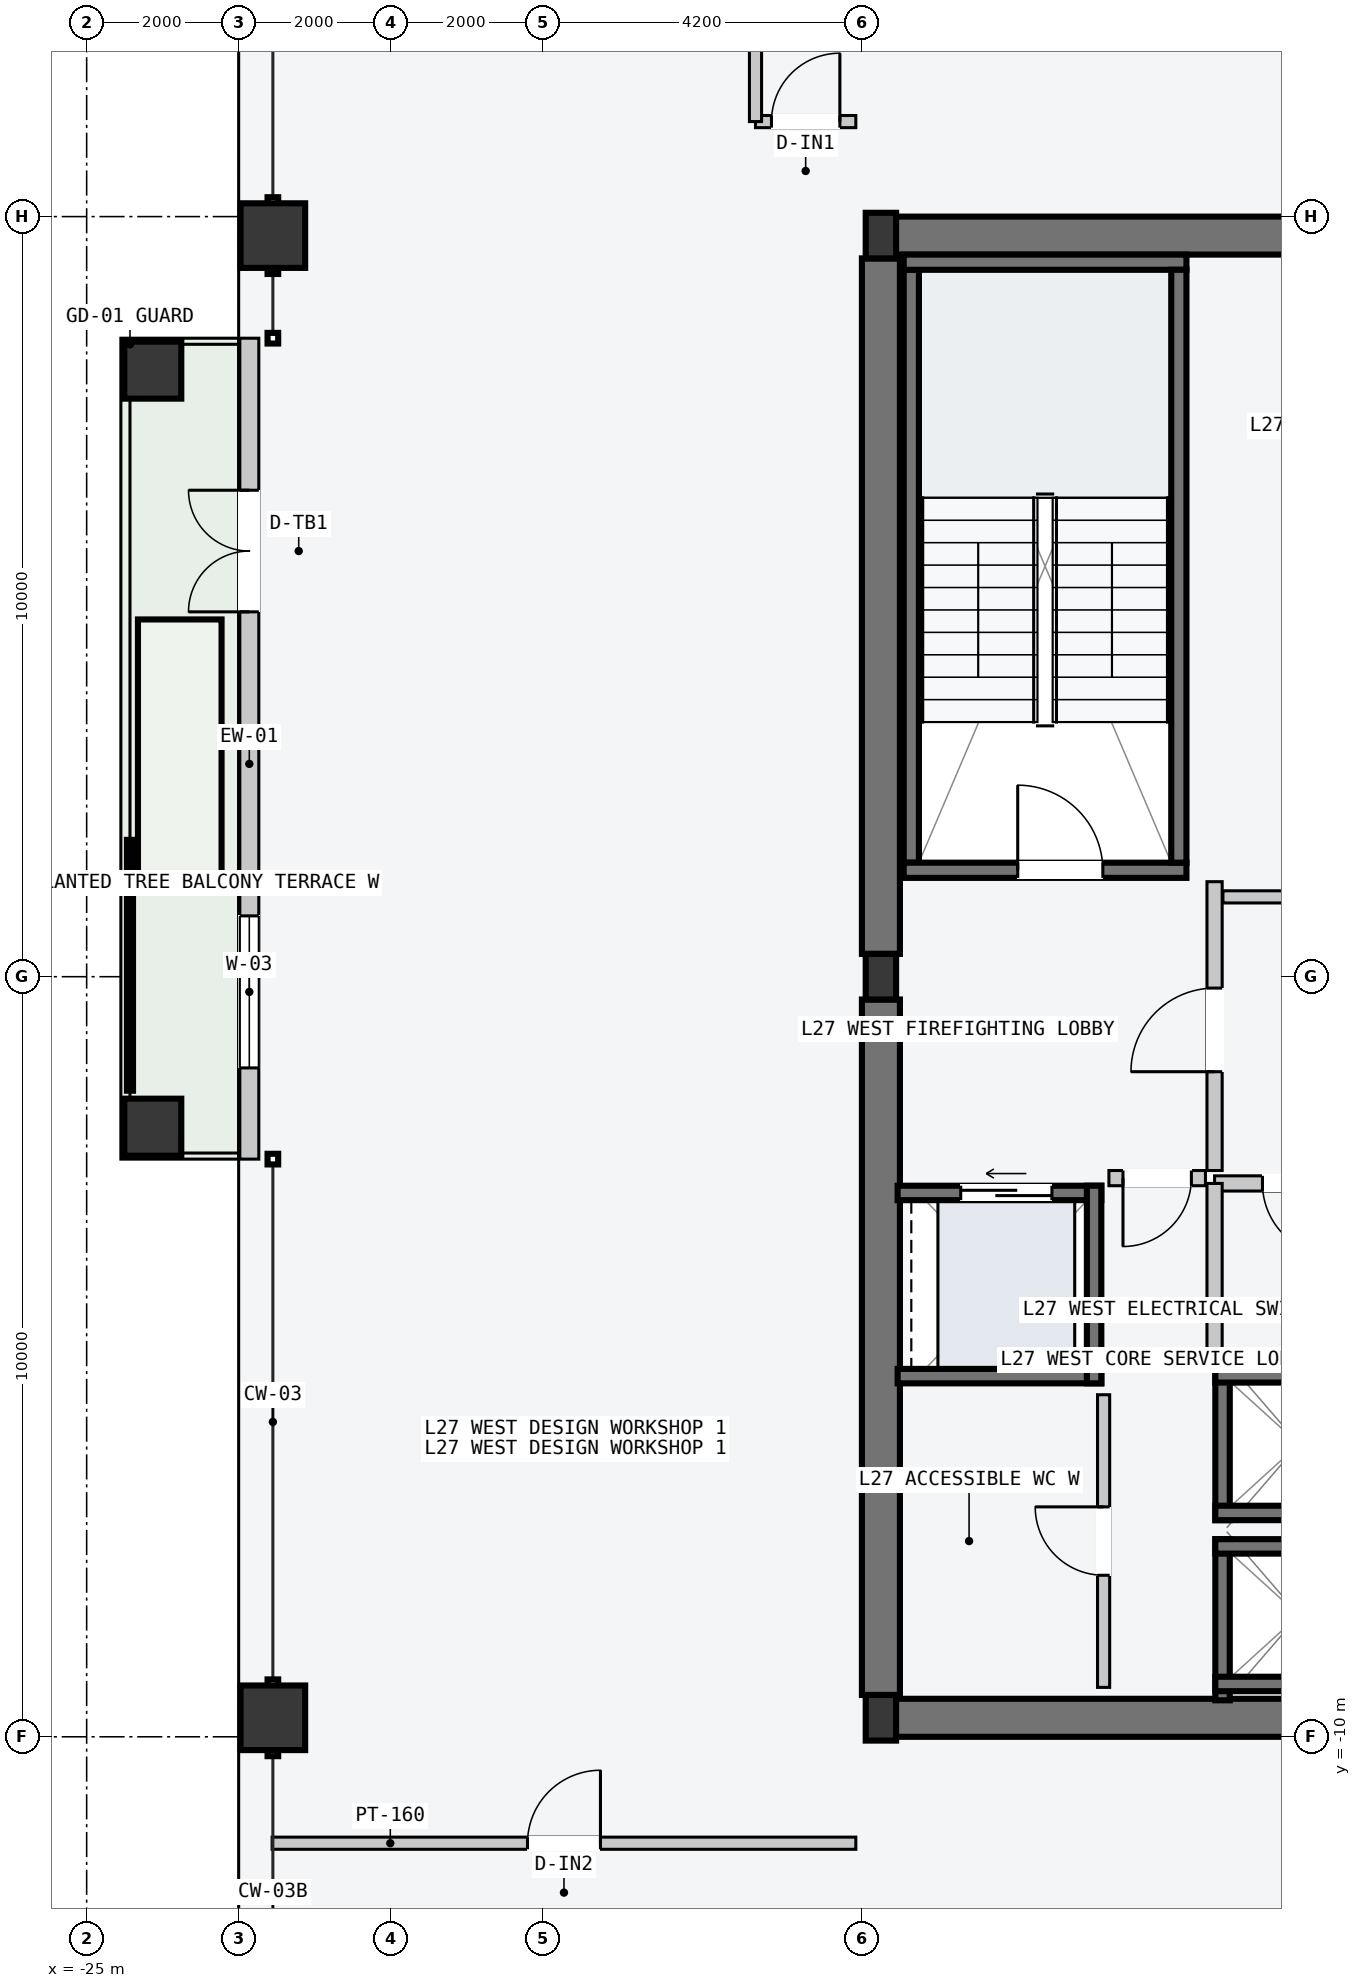
"""IFC4 building model, lengths in metres.
Left out: names, types, materials, properties, quantities, classifications, styles, units other than length and angle.
Written with IfcOpenShell. Run it as: python <this file> out.ifc"""

import sys

from ifc_helpers import new_model, si_unit, direction, frame, frame_2d, origin, origin_2d, place, context, subcontext, project, spatial, rectangle, hollow_rectangle, i_section, extrude, element, fill, save


model = new_model("IFC4")
c1 = context("Model", 3, precision=1e-05, world=origin(), true_north=direction((0.0, 1.0)))
c2 = subcontext(c1, "Body", "Model", "MODEL_VIEW")
j1 = project(units=[si_unit("LENGTHUNIT", "METRE"), si_unit("PLANEANGLEUNIT", "RADIAN")], contexts=[c1])
p1 = place(None, origin())
s1 = spatial("IfcSite", under=j1, at=p1, CompositionType="ELEMENT")
p2 = place(p1, origin())
s2 = spatial("IfcBuilding", under=s1, at=p2, CompositionType="ELEMENT")
p3 = place(p2, frame((0.0, 0.0, 106.2)))
s3 = spatial("IfcBuildingStorey", under=s2, at=p3, CompositionType="ELEMENT", Elevation=106.2)
for number, where, z_axis, x_axis in (
    (1, (-14.53, -9.75, -0.2), (0.0, 0.0, 1.0), (1.0, 0.0, 0.0)),
    (2, (-14.53, 9.75, -0.2), (0.0, 0.0, 1.0), (1.0, 0.0, 0.0)),
):
    element("IfcWall", number, at=place(p3, frame(where, z_axis=z_axis, x_axis=x_axis)), inside=s3, PredefinedType="SHEAR", context=c2, shape_type="SweptSolid", body=[
        extrude(rectangle(XDim=6.46, YDim=0.5, at=frame_2d((3.23, 0.0))), origin(), (0.0, 0.0, 1.0), 3.6),
    ])
for number, where, z_axis, x_axis in (
    (3, (-14.55, -9.45, -0.2), (0.0, 0.0, 1.0), (0.0, 1.0, 0.0)),
    (4, (-14.55, 0.3, -0.2), (0.0, 0.0, 1.0), (0.0, 1.0, 0.0)),
):
    element("IfcWall", number, at=place(p3, frame(where, z_axis=z_axis, x_axis=x_axis)), inside=s3, PredefinedType="SHEAR", context=c2, shape_type="SweptSolid", body=[
        extrude(rectangle(XDim=9.15, YDim=0.5, at=frame_2d((4.575, 0.0))), origin(), (0.0, 0.0, 1.0), 3.6),
    ])
p4 = place(p3, frame((-14.15, 1.5, -0.2), z_axis=(0.0, 0.0, 1.0), x_axis=(0.0, 1.0, 0.0)))
e5 = element("IfcWall", 5, at=p4, inside=s3, PredefinedType="SOLIDWALL", context=c2, shape_type="SweptSolid", body=[
    extrude(rectangle(XDim=7.8, YDim=0.2, at=frame_2d((3.9, 0.0))), origin(), (0.0, 0.0, 1.0), 3.6),
])
p5 = place(p3, frame((-14.25, 1.4, -0.2), z_axis=(0.0, 0.0, 1.0), x_axis=(1.0, 0.0, 0.0)))
e6 = element("IfcWall", 6, at=p5, inside=s3, PredefinedType="SOLIDWALL", context=c2, shape_type="SweptSolid", body=[
    extrude(rectangle(XDim=3.72, YDim=0.2, at=frame_2d((1.86, 0.0))), origin(), (0.0, 0.0, 1.0), 3.6),
])
p6 = place(p5, frame((1.5, 0.0, 0.2)))
e7 = element("IfcOpeningElement", 7, at=p6, cuts=e6, PredefinedType="OPENING", context=c2, shape_type="SweptSolid", body=[
    extrude(rectangle(XDim=1.12, YDim=2.18, at=frame_2d((0.56, 1.09))), frame((0.0, 0.11, 0.0), z_axis=(0.0, -1.0, 0.0), x_axis=(1.0, 0.0, 0.0)), (0.0, 0.0, 1.0), 0.22),
])
p7 = place(p3, frame((-14.25, 9.4, -0.2), z_axis=(0.0, 0.0, 1.0), x_axis=(1.0, 0.0, 0.0)))
e8 = element("IfcWall", 8, at=p7, inside=s3, PredefinedType="SOLIDWALL", context=c2, shape_type="SweptSolid", body=[
    extrude(rectangle(XDim=3.72, YDim=0.2, at=frame_2d((1.86, 0.0))), origin(), (0.0, 0.0, 1.0), 3.6),
])
p8 = place(p3, frame((-10.63, 1.5, -0.2), z_axis=(0.0, 0.0, 1.0), x_axis=(0.0, 1.0, 0.0)))
e9 = element("IfcWall", 9, at=p8, inside=s3, PredefinedType="SOLIDWALL", context=c2, shape_type="SweptSolid", body=[
    extrude(rectangle(XDim=7.8, YDim=0.2, at=frame_2d((3.9, 0.0))), origin(), (0.0, 0.0, 1.0), 3.6),
])
for number, where, z_axis, x_axis in (
    (10, (-14.55, -9.75, 0.0), (0.0, 0.0, 1.0), (1.0, 0.0, 0.0)),
    (11, (-14.55, 0.0, 0.0), (0.0, 0.0, 1.0), (1.0, 0.0, 0.0)),
    (12, (-14.55, 9.75, 0.0), (0.0, 0.0, 1.0), (1.0, 0.0, 0.0)),
):
    element("IfcColumn", number, at=place(p3, frame(where, z_axis=z_axis, x_axis=x_axis)), inside=s3, PredefinedType="COLUMN", context=c2, shape_type="SweptSolid", body=[
        extrude(i_section(OverallWidth=0.4, OverallDepth=0.6, WebThickness=0.022, FlangeThickness=0.036, at=origin_2d()), origin(), (0.0, 0.0, 1.0), 3.6),
    ])
for number, where, z_axis, x_axis in (
    (13, (-22.55, -9.75, 0.0), (0.0, 0.0, 1.0), (0.0, 1.0, 0.0)),
    (14, (-22.55, 9.75, 0.0), (0.0, 0.0, 1.0), (0.0, 1.0, 0.0)),
):
    element("IfcColumn", number, at=place(p3, frame(where, z_axis=z_axis, x_axis=x_axis)), inside=s3, PredefinedType="COLUMN", context=c2, shape_type="SweptSolid", body=[
        extrude(hollow_rectangle(XDim=0.85, YDim=0.85, WallThickness=0.04, at=origin_2d()), origin(), (0.0, 0.0, 1.0), 3.6),
    ])
for number, where, z_axis, x_axis in (
    (15, (-24.13, -1.98, 0.0), (0.0, 0.0, 1.0), (0.0, 1.0, 0.0)),
    (16, (-24.13, 7.98, 0.0), (0.0, 0.0, 1.0), (0.0, 1.0, 0.0)),
):
    element("IfcColumn", number, at=place(p3, frame(where, z_axis=z_axis, x_axis=x_axis)), inside=s3, PredefinedType="COLUMN", context=c2, shape_type="SweptSolid", body=[
        extrude(hollow_rectangle(XDim=0.75, YDim=0.75, WallThickness=0.032, at=origin_2d()), origin(), (0.0, 0.0, 1.0), 3.6),
    ])
p9 = place(p3, frame((-22.86, -2.4, 0.0), z_axis=(0.0, 0.0, 1.0), x_axis=(0.0, 1.0, 0.0)))
e17 = element("IfcWall", 17, at=p9, inside=s3, PredefinedType="STANDARD", context=c2, shape_type="SweptSolid", body=[
    extrude(rectangle(XDim=10.8, YDim=0.25, at=frame_2d((5.4, 0.0))), origin(), (0.0, 0.0, 1.0), 3.4),
])
p10 = place(p9, frame((7.2, 0.0, 0.0)))
e18 = element("IfcOpeningElement", 18, at=p10, cuts=e17, PredefinedType="OPENING", context=c2, shape_type="SweptSolid", body=[
    extrude(rectangle(XDim=1.6, YDim=2.2, at=frame_2d((0.8, 1.1))), frame((0.0, 0.135, 0.0), z_axis=(0.0, -1.0, 0.0), x_axis=(1.0, 0.0, 0.0)), (0.0, 0.0, 1.0), 0.27),
])
p11 = place(p9, frame((1.2, 0.0, 0.85)))
e19 = element("IfcOpeningElement", 19, at=p11, cuts=e17, PredefinedType="OPENING", context=c2, shape_type="SweptSolid", body=[
    extrude(rectangle(XDim=2.0, YDim=2.1, at=frame_2d((1.0, 1.05))), frame((0.0, 0.135, 0.0), z_axis=(0.0, -1.0, 0.0), x_axis=(1.0, 0.0, 0.0)), (0.0, 0.0, 1.0), 0.27),
])
p12 = place(p3, frame((-10.055, -9.52, -0.2), z_axis=(0.0, 0.0, 1.0), x_axis=(0.0, 1.0, 0.0)))
e20 = element("IfcWall", 20, at=p12, inside=s3, PredefinedType="SOLIDWALL", context=c2, shape_type="SweptSolid", body=[
    extrude(rectangle(XDim=2.12, YDim=0.19, at=frame_2d((1.06, 0.0))), origin(), (0.0, 0.0, 1.0), 3.6),
])
for number, where, z_axis, x_axis in (
    (21, (-10.15, -7.495, -0.2), (0.0, 0.0, 1.0), (1.0, 0.0, 0.0)),
    (22, (-10.15, -9.305, -0.2), (0.0, 0.0, 1.0), (1.0, 0.0, 0.0)),
):
    element("IfcWall", number, at=place(p3, frame(where, z_axis=z_axis, x_axis=x_axis)), inside=s3, PredefinedType="SOLIDWALL", context=c2, shape_type="SweptSolid", body=[
        extrude(rectangle(XDim=2.2, YDim=0.19, at=frame_2d((1.1, 0.0))), origin(), (0.0, 0.0, 1.0), 3.6),
    ])
p13 = place(p3, frame((-10.055, -7.15, -0.2), z_axis=(0.0, 0.0, 1.0), x_axis=(0.0, 1.0, 0.0)))
e23 = element("IfcWall", 23, at=p13, inside=s3, PredefinedType="SOLIDWALL", context=c2, shape_type="SweptSolid", body=[
    extrude(rectangle(XDim=2.0, YDim=0.19, at=frame_2d((1.0, 0.0))), origin(), (0.0, 0.0, 1.0), 3.6),
])
for number, where, z_axis, x_axis in (
    (24, (-10.15, -5.245, -0.2), (0.0, 0.0, 1.0), (1.0, 0.0, 0.0)),
    (25, (-10.15, -7.055, -0.2), (0.0, 0.0, 1.0), (1.0, 0.0, 0.0)),
):
    element("IfcWall", number, at=place(p3, frame(where, z_axis=z_axis, x_axis=x_axis)), inside=s3, PredefinedType="SOLIDWALL", context=c2, shape_type="SweptSolid", body=[
        extrude(rectangle(XDim=2.2, YDim=0.19, at=frame_2d((1.1, 0.0))), origin(), (0.0, 0.0, 1.0), 3.6),
    ])
p14 = place(p3, frame((-14.33, -2.845, -0.2), z_axis=(0.0, 0.0, 1.0), x_axis=(1.0, 0.0, 0.0)))
e26 = element("IfcWall", 26, at=p14, inside=s3, PredefinedType="SOLIDWALL", context=c2, shape_type="SweptSolid", body=[
    extrude(rectangle(XDim=2.68, YDim=0.19, at=frame_2d((1.34, 0.0))), origin(), (0.0, 0.0, 1.0), 3.6),
])
p15 = place(p14, frame((0.83, 0.0, 0.2)))
e27 = element("IfcOpeningElement", 27, at=p15, cuts=e26, PredefinedType="OPENING", context=c2, shape_type="SweptSolid", body=[
    extrude(rectangle(XDim=1.2, YDim=2.2, at=frame_2d((0.6, 1.1))), frame((0.0, 0.105, 0.0), z_axis=(0.0, -1.0, 0.0), x_axis=(1.0, 0.0, 0.0)), (0.0, 0.0, 1.0), 0.21),
])
p16 = place(p3, frame((-14.33, -5.255, -0.2), z_axis=(0.0, 0.0, 1.0), x_axis=(1.0, 0.0, 0.0)))
e28 = element("IfcWall", 28, at=p16, inside=s3, PredefinedType="SOLIDWALL", context=c2, shape_type="SweptSolid", body=[
    extrude(rectangle(XDim=2.68, YDim=0.19, at=frame_2d((1.34, 0.0))), origin(), (0.0, 0.0, 1.0), 3.6),
])
p17 = place(p3, frame((-11.745, -5.35, -0.2), z_axis=(0.0, 0.0, 1.0), x_axis=(0.0, 1.0, 0.0)))
e29 = element("IfcWall", 29, at=p17, inside=s3, PredefinedType="SOLIDWALL", context=c2, shape_type="SweptSolid", body=[
    extrude(rectangle(XDim=2.6, YDim=0.19, at=frame_2d((1.3, 0.0))), origin(), (0.0, 0.0, 1.0), 3.6),
])
p18 = place(p3, frame((-10.16, -2.55, 0.0), z_axis=(0.0, 0.0, 1.0), x_axis=(0.0, 1.0, 0.0)))
e30 = element("IfcWall", 30, at=p18, inside=s3, PredefinedType="PARTITIONING", context=c2, shape_type="SweptSolid", body=[
    extrude(rectangle(XDim=3.8, YDim=0.2, at=frame_2d((1.9, 0.0))), origin(), (0.0, 0.0, 1.0), 3.4),
])
p19 = place(p18, frame((1.3, 0.0, 0.0)))
e31 = element("IfcOpeningElement", 31, at=p19, cuts=e30, PredefinedType="OPENING", context=c2, shape_type="SweptSolid", body=[
    extrude(rectangle(XDim=1.1, YDim=2.15, at=frame_2d((0.55, 1.075))), frame((0.0, 0.11, 0.0), z_axis=(0.0, -1.0, 0.0), x_axis=(1.0, 0.0, 0.0)), (0.0, 0.0, 1.0), 0.22),
])
p20 = place(p3, frame((-10.28, -2.65, 0.0), z_axis=(0.0, 0.0, 1.0), x_axis=(-1.0, 0.0, 0.0)))
e32 = element("IfcWall", 32, at=p20, inside=s3, PredefinedType="PARTITIONING", context=c2, shape_type="SweptSolid", body=[
    extrude(rectangle(XDim=1.27, YDim=0.2, at=frame_2d((0.635, 0.0))), origin(), (0.0, 0.0, 1.0), 3.4),
])
p21 = place(p20, frame((0.185, 0.0, 0.0)))
e33 = element("IfcOpeningElement", 33, at=p21, cuts=e32, PredefinedType="OPENING", context=c2, shape_type="SweptSolid", body=[
    extrude(rectangle(XDim=0.9, YDim=2.15, at=frame_2d((0.45, 1.075))), frame((0.0, 0.11, 0.0), z_axis=(0.0, -1.0, 0.0), x_axis=(1.0, 0.0, 0.0)), (0.0, 0.0, 1.0), 0.22),
])
p22 = place(p3, frame((-7.96, -2.72, 0.0), z_axis=(0.0, 0.0, 1.0), x_axis=(-1.0, 0.0, 0.0)))
e34 = element("IfcWall", 34, at=p22, inside=s3, PredefinedType="PARTITIONING", context=c2, shape_type="SweptSolid", body=[
    extrude(rectangle(XDim=2.2, YDim=0.2, at=frame_2d((1.1, 0.0))), origin(), (0.0, 0.0, 1.0), 3.4),
])
p23 = place(p22, frame((0.62, 0.0, 0.0)))
e35 = element("IfcOpeningElement", 35, at=p23, cuts=e34, PredefinedType="OPENING", context=c2, shape_type="SweptSolid", body=[
    extrude(rectangle(XDim=0.95, YDim=2.1, at=frame_2d((0.475, 1.05))), frame((0.0, 0.11, 0.0), z_axis=(0.0, -1.0, 0.0), x_axis=(1.0, 0.0, 0.0)), (0.0, 0.0, 1.0), 0.22),
])
p24 = place(p3, frame((-10.16, -5.16, 0.0), z_axis=(0.0, 0.0, 1.0), x_axis=(0.0, 1.0, 0.0)))
e36 = element("IfcWall", 36, at=p24, inside=s3, PredefinedType="PARTITIONING", context=c2, shape_type="SweptSolid", body=[
    extrude(rectangle(XDim=2.44, YDim=0.2, at=frame_2d((1.22, 0.0))), origin(), (0.0, 0.0, 1.0), 3.4),
])
p25 = place(p3, frame((-11.62, -9.35, 0.0), z_axis=(0.0, 0.0, 1.0), x_axis=(0.0, 1.0, 0.0)))
e37 = element("IfcWall", 37, at=p25, inside=s3, PredefinedType="PARTITIONING", context=c2, shape_type="SweptSolid", body=[
    extrude(rectangle(XDim=3.85, YDim=0.16, at=frame_2d((1.925, 0.0))), origin(), (0.0, 0.0, 1.0), 3.4),
])
p26 = place(p25, frame((1.475, 0.0, 0.0)))
e38 = element("IfcOpeningElement", 38, at=p26, cuts=e37, PredefinedType="OPENING", context=c2, shape_type="SweptSolid", body=[
    extrude(rectangle(XDim=0.9, YDim=2.15, at=frame_2d((0.45, 1.075))), frame((0.0, 0.09, 0.0), z_axis=(0.0, -1.0, 0.0), x_axis=(1.0, 0.0, 0.0)), (0.0, 0.0, 1.0), 0.18),
])
p27 = place(p3, frame((-10.05, 1.05, 0.0), z_axis=(0.0, 0.0, 1.0), x_axis=(1.0, 0.0, 0.0)))
e39 = element("IfcWall", 39, at=p27, inside=s3, PredefinedType="PARTITIONING", context=c2, shape_type="SweptSolid", body=[
    extrude(rectangle(XDim=6.21, YDim=0.16, at=frame_2d((3.105, 0.0))), origin(), (0.0, 0.0, 1.0), 3.4),
])
p28 = place(p3, frame((-22.56, -11.4, 0.0), z_axis=(0.0, 0.0, 1.0), x_axis=(1.0, 0.0, 0.0)))
e40 = element("IfcWall", 40, at=p28, inside=s3, PredefinedType="PARTITIONING", context=c2, shape_type="SweptSolid", body=[
    extrude(rectangle(XDim=7.68, YDim=0.16, at=frame_2d((3.84, 0.0))), origin(), (0.0, 0.0, 1.0), 3.4),
])
p29 = place(p28, frame((3.36, 0.0, 0.0)))
e41 = element("IfcOpeningElement", 41, at=p29, cuts=e40, PredefinedType="OPENING", context=c2, shape_type="SweptSolid", body=[
    extrude(rectangle(XDim=0.96, YDim=2.18, at=frame_2d((0.48, 1.09))), frame((0.0, 0.09, 0.0), z_axis=(0.0, -1.0, 0.0), x_axis=(1.0, 0.0, 0.0)), (0.0, 0.0, 1.0), 0.18),
])
p30 = place(p3, frame((-16.2, 11.25, 0.0), z_axis=(0.0, 0.0, 1.0), x_axis=(1.0, 0.0, 0.0)))
e42 = element("IfcWall", 42, at=p30, inside=s3, PredefinedType="PARTITIONING", context=c2, shape_type="SweptSolid", body=[
    extrude(rectangle(XDim=1.32, YDim=0.16, at=frame_2d((0.66, 0.0))), origin(), (0.0, 0.0, 1.0), 3.4),
])
p31 = place(p30, frame((0.21, 0.0, 0.0)))
e43 = element("IfcOpeningElement", 43, at=p31, cuts=e42, PredefinedType="OPENING", context=c2, shape_type="SweptSolid", body=[
    extrude(rectangle(XDim=0.9, YDim=2.15, at=frame_2d((0.45, 1.075))), frame((0.0, 0.09, 0.0), z_axis=(0.0, -1.0, 0.0), x_axis=(1.0, 0.0, 0.0)), (0.0, 0.0, 1.0), 0.18),
])
p32 = place(p3, frame((-16.2, 11.25, 0.0), z_axis=(0.0, 0.0, 1.0), x_axis=(0.0, 1.0, 0.0)))
e44 = element("IfcWall", 44, at=p32, inside=s3, PredefinedType="PARTITIONING", context=c2, shape_type="SweptSolid", body=[
    extrude(rectangle(XDim=1.95, YDim=0.16, at=frame_2d((0.975, 0.0))), origin(), (0.0, 0.0, 1.0), 3.4),
])
p33 = place(p6, origin())
e45 = element("IfcDoor", 45, at=p33, inside=s3, OperationType="SINGLE_SWING_LEFT", PredefinedType="DOOR", context=c2, shape_type="SweptSolid", body=[
    extrude(rectangle(XDim=1.12, YDim=2.18, at=frame_2d((0.56, 1.09))), frame((0.0, 0.025, 0.0), z_axis=(0.0, -1.0, 0.0), x_axis=(1.0, 0.0, 0.0)), (0.0, 0.0, 1.0), 0.05),
])
fill(e7, e45)
p34 = place(p10, origin())
e46 = element("IfcDoor", 46, at=p34, inside=s3, OperationType="DOUBLE_DOOR_SINGLE_SWING", PredefinedType="DOOR", context=c2, shape_type="SweptSolid", body=[
    extrude(rectangle(XDim=1.6, YDim=2.2, at=frame_2d((0.8, 1.1))), frame((0.0, 0.025, 0.0), z_axis=(0.0, -1.0, 0.0), x_axis=(1.0, 0.0, 0.0)), (0.0, 0.0, 1.0), 0.05),
])
fill(e18, e46)
p35 = place(p11, origin())
e47 = element("IfcWindow", 47, at=p35, inside=s3, PartitioningType="SINGLE_PANEL", PredefinedType="WINDOW", context=c2, shape_type="SweptSolid", body=[
    extrude(rectangle(XDim=2.0, YDim=2.1, at=frame_2d((1.0, 1.05))), frame((0.0, 0.03, 0.0), z_axis=(0.0, -1.0, 0.0), x_axis=(1.0, 0.0, 0.0)), (0.0, 0.0, 1.0), 0.06),
])
fill(e19, e47)
p36 = place(p15, origin())
e48 = element("IfcDoor", 48, at=p36, inside=s3, OperationType="SLIDING_TO_LEFT", PredefinedType="DOOR", context=c2, shape_type="SweptSolid", body=[
    extrude(rectangle(XDim=1.2, YDim=2.2, at=frame_2d((0.6, 1.1))), frame((0.0, 0.025, 0.0), z_axis=(0.0, -1.0, 0.0), x_axis=(1.0, 0.0, 0.0)), (0.0, 0.0, 1.0), 0.05),
])
fill(e27, e48)
p37 = place(p19, origin())
e49 = element("IfcDoor", 49, at=p37, inside=s3, OperationType="SINGLE_SWING_LEFT", PredefinedType="DOOR", context=c2, shape_type="SweptSolid", body=[
    extrude(rectangle(XDim=1.1, YDim=2.15, at=frame_2d((0.55, 1.075))), frame((0.0, 0.025, 0.0), z_axis=(0.0, -1.0, 0.0), x_axis=(1.0, 0.0, 0.0)), (0.0, 0.0, 1.0), 0.05),
])
fill(e31, e49)
p38 = place(p21, origin())
e50 = element("IfcDoor", 50, at=p38, inside=s3, OperationType="SINGLE_SWING_RIGHT", PredefinedType="DOOR", context=c2, shape_type="SweptSolid", body=[
    extrude(rectangle(XDim=0.9, YDim=2.15, at=frame_2d((0.45, 1.075))), frame((0.0, 0.025, 0.0), z_axis=(0.0, -1.0, 0.0), x_axis=(1.0, 0.0, 0.0)), (0.0, 0.0, 1.0), 0.05),
])
fill(e33, e50)
p39 = place(p23, origin())
e51 = element("IfcDoor", 51, at=p39, inside=s3, OperationType="SINGLE_SWING_LEFT", PredefinedType="DOOR", context=c2, shape_type="SweptSolid", body=[
    extrude(rectangle(XDim=0.95, YDim=2.1, at=frame_2d((0.475, 1.05))), frame((0.0, 0.025, 0.0), z_axis=(0.0, -1.0, 0.0), x_axis=(1.0, 0.0, 0.0)), (0.0, 0.0, 1.0), 0.05),
])
fill(e35, e51)
p40 = place(p26, origin())
e52 = element("IfcDoor", 52, at=p40, inside=s3, OperationType="SINGLE_SWING_RIGHT", PredefinedType="DOOR", context=c2, shape_type="SweptSolid", body=[
    extrude(rectangle(XDim=0.9, YDim=2.15, at=frame_2d((0.45, 1.075))), frame((0.0, 0.025, 0.0), z_axis=(0.0, -1.0, 0.0), x_axis=(1.0, 0.0, 0.0)), (0.0, 0.0, 1.0), 0.05),
])
fill(e38, e52)
p41 = place(p29, origin())
e53 = element("IfcDoor", 53, at=p41, inside=s3, OperationType="SINGLE_SWING_RIGHT", PredefinedType="DOOR", context=c2, shape_type="SweptSolid", body=[
    extrude(rectangle(XDim=0.96, YDim=2.18, at=frame_2d((0.48, 1.09))), frame((0.0, 0.025, 0.0), z_axis=(0.0, -1.0, 0.0), x_axis=(1.0, 0.0, 0.0)), (0.0, 0.0, 1.0), 0.05),
])
fill(e41, e53)
p42 = place(p31, origin())
e54 = element("IfcDoor", 54, at=p42, inside=s3, OperationType="SINGLE_SWING_RIGHT", PredefinedType="DOOR", context=c2, shape_type="SweptSolid", body=[
    extrude(rectangle(XDim=0.9, YDim=2.15, at=frame_2d((0.45, 1.075))), frame((0.0, 0.025, 0.0), z_axis=(0.0, -1.0, 0.0), x_axis=(1.0, 0.0, 0.0)), (0.0, 0.0, 1.0), 0.05),
])
fill(e43, e54)
save(model, sys.argv[1])
